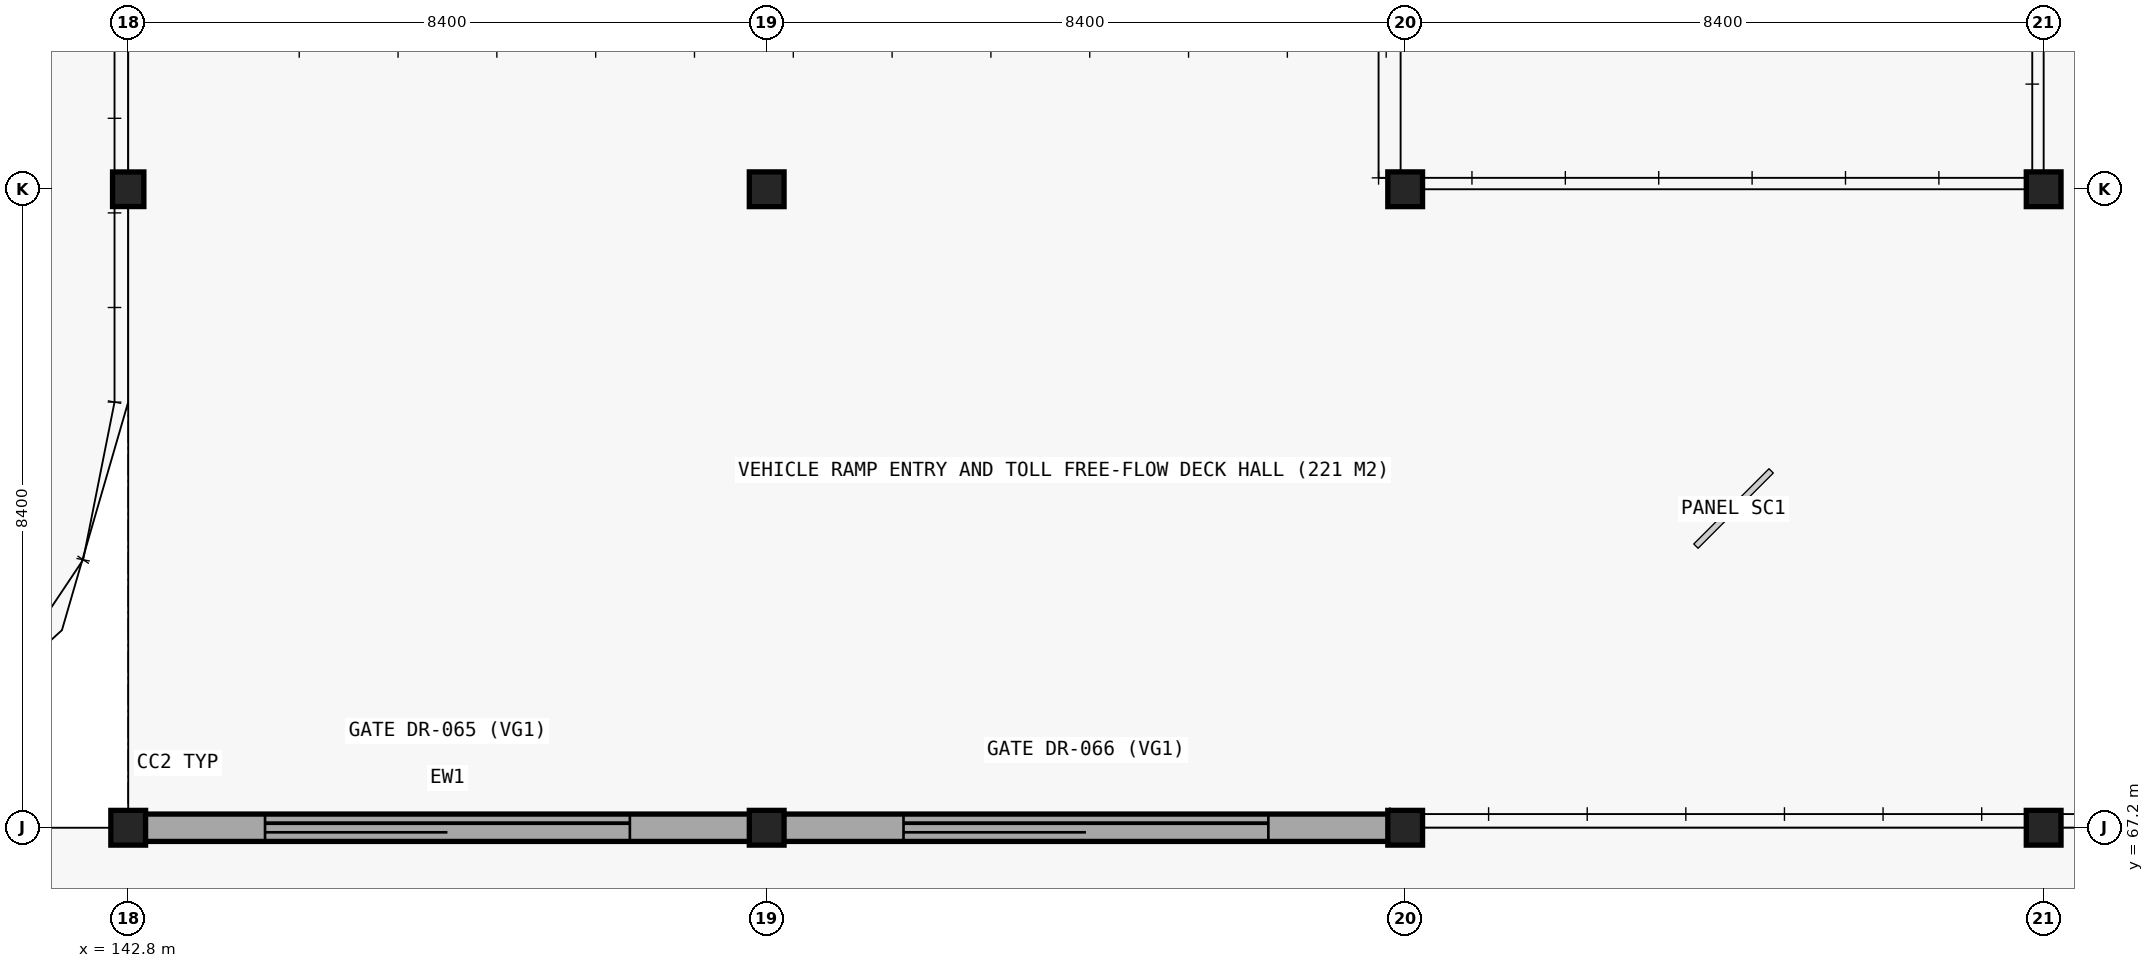
"""IFC4 building model, lengths in metres.
Left out: names, types, materials, properties, quantities, classifications, styles, units other than length and angle.
Written with IfcOpenShell. Run it as: python <this file> out.ifc"""

import sys

from ifc_helpers import new_model, si_unit, direction, frame, frame_2d, origin, origin_2d, place, context, subcontext, project, spatial, rectangle, hollow_circle, i_section, extrude, element, fill, save


model = new_model("IFC4")
c1 = context("Model", 3, precision=1e-05, world=origin(), true_north=direction((0.0, 1.0)))
c2 = subcontext(c1, "Body", "Model", "MODEL_VIEW")
j1 = project(units=[si_unit("LENGTHUNIT", "METRE"), si_unit("PLANEANGLEUNIT", "RADIAN")], contexts=[c1])
p1 = place(None, origin())
s1 = spatial("IfcSite", under=j1, at=p1, CompositionType="ELEMENT")
p2 = place(p1, origin())
s2 = spatial("IfcBuilding", under=s1, at=p2, CompositionType="ELEMENT")
p3 = place(p2, origin())
s3 = spatial("IfcBuildingStorey", under=s2, at=p3, CompositionType="ELEMENT", Elevation=0.0)
p4 = place(p3, frame((142.8, 67.2, 0.0), z_axis=(0.0, 0.0, 1.0), x_axis=(1.0, 0.0, 0.0)))
e1 = element("IfcColumn", 1, at=p4, inside=s3, PredefinedType="COLUMN", context=c2, shape_type="SweptSolid", body=[
    extrude(hollow_circle(Radius=0.229, WallThickness=0.014, at=origin_2d()), origin(), (0.0, 0.0, 1.0), 4.8),
])
p5 = place(p3, frame((142.8, 75.6, 0.0), z_axis=(0.0, 0.0, 1.0), x_axis=(1.0, 0.0, 0.0)))
e2 = element("IfcColumn", 2, at=p5, inside=s3, PredefinedType="COLUMN", context=c2, shape_type="SweptSolid", body=[
    extrude(i_section(OverallWidth=0.412, OverallDepth=0.455, WebThickness=0.031, FlangeThickness=0.049, FilletRadius=0.015, at=origin_2d()), origin(), (0.0, 0.0, 1.0), 4.8),
])
for number, where, z_axis, x_axis in (
    (3, (151.2, 67.2, 0.0), (0.0, 0.0, 1.0), (1.0, 0.0, 0.0)),
    (4, (151.2, 75.6, 0.0), (0.0, 0.0, 1.0), (1.0, 0.0, 0.0)),
    (5, (159.6, 67.2, 0.0), (0.0, 0.0, 1.0), (1.0, 0.0, 0.0)),
    (6, (159.6, 75.6, 0.0), (0.0, 0.0, 1.0), (1.0, 0.0, 0.0)),
    (7, (168.0, 67.2, 0.0), (0.0, 0.0, 1.0), (1.0, 0.0, 0.0)),
    (8, (168.0, 75.6, 0.0), (0.0, 0.0, 1.0), (1.0, 0.0, 0.0)),
):
    element("IfcColumn", number, at=place(p3, frame(where, z_axis=z_axis, x_axis=x_axis)), inside=s3, PredefinedType="COLUMN", context=c2, shape_type="SweptSolid", body=[
        extrude(hollow_circle(Radius=0.229, WallThickness=0.014, at=origin_2d()), origin(), (0.0, 0.0, 1.0), 4.8),
    ])
p6 = place(p3, frame((142.8, 67.2, 0.0), z_axis=(0.0, 0.0, 1.0), x_axis=(1.0, 0.0, 0.0)))
e9 = element("IfcWall", 9, at=p6, inside=s3, PredefinedType="STANDARD", context=c2, shape_type="SweptSolid", body=[
    extrude(rectangle(XDim=8.4, YDim=0.36, at=frame_2d((4.2, 0.0))), origin(), (0.0, 0.0, 1.0), 4.1),
])
p7 = place(p6, frame((1.8, 0.0, 0.0)))
e10 = element("IfcOpeningElement", 10, at=p7, cuts=e9, PredefinedType="OPENING", context=c2, shape_type="SweptSolid", body=[
    extrude(rectangle(XDim=4.8, YDim=3.6, at=frame_2d((2.4, 1.8))), frame((0.0, 0.19, 0.0), z_axis=(0.0, -1.0, 0.0), x_axis=(1.0, 0.0, 0.0)), (0.0, 0.0, 1.0), 0.38),
])
p8 = place(p3, frame((151.2, 67.2, 0.0), z_axis=(0.0, 0.0, 1.0), x_axis=(1.0, 0.0, 0.0)))
e11 = element("IfcWall", 11, at=p8, inside=s3, PredefinedType="STANDARD", context=c2, shape_type="SweptSolid", body=[
    extrude(rectangle(XDim=8.4, YDim=0.36, at=frame_2d((4.2, 0.0))), origin(), (0.0, 0.0, 1.0), 4.1),
])
p9 = place(p8, frame((1.8, 0.0, 0.0)))
e12 = element("IfcOpeningElement", 12, at=p9, cuts=e11, PredefinedType="OPENING", context=c2, shape_type="SweptSolid", body=[
    extrude(rectangle(XDim=4.8, YDim=3.6, at=frame_2d((2.4, 1.8))), frame((0.0, 0.19, 0.0), z_axis=(0.0, -1.0, 0.0), x_axis=(1.0, 0.0, 0.0)), (0.0, 0.0, 1.0), 0.38),
])
p10 = place(p7, origin())
e13 = element("IfcDoor", 13, at=p10, inside=s3, OperationType="ROLLINGUP", PredefinedType="GATE", context=c2, shape_type="SweptSolid", body=[
    extrude(rectangle(XDim=4.8, YDim=3.6, at=frame_2d((2.4, 1.8))), frame((0.0, 0.025, 0.0), z_axis=(0.0, -1.0, 0.0), x_axis=(1.0, 0.0, 0.0)), (0.0, 0.0, 1.0), 0.05),
])
fill(e10, e13)
p11 = place(p9, origin())
e14 = element("IfcDoor", 14, at=p11, inside=s3, OperationType="ROLLINGUP", PredefinedType="GATE", context=c2, shape_type="SweptSolid", body=[
    extrude(rectangle(XDim=4.8, YDim=3.6, at=frame_2d((2.4, 1.8))), frame((0.0, 0.025, 0.0), z_axis=(0.0, -1.0, 0.0), x_axis=(1.0, 0.0, 0.0)), (0.0, 0.0, 1.0), 0.05),
])
fill(e12, e14)
save(model, sys.argv[1])
